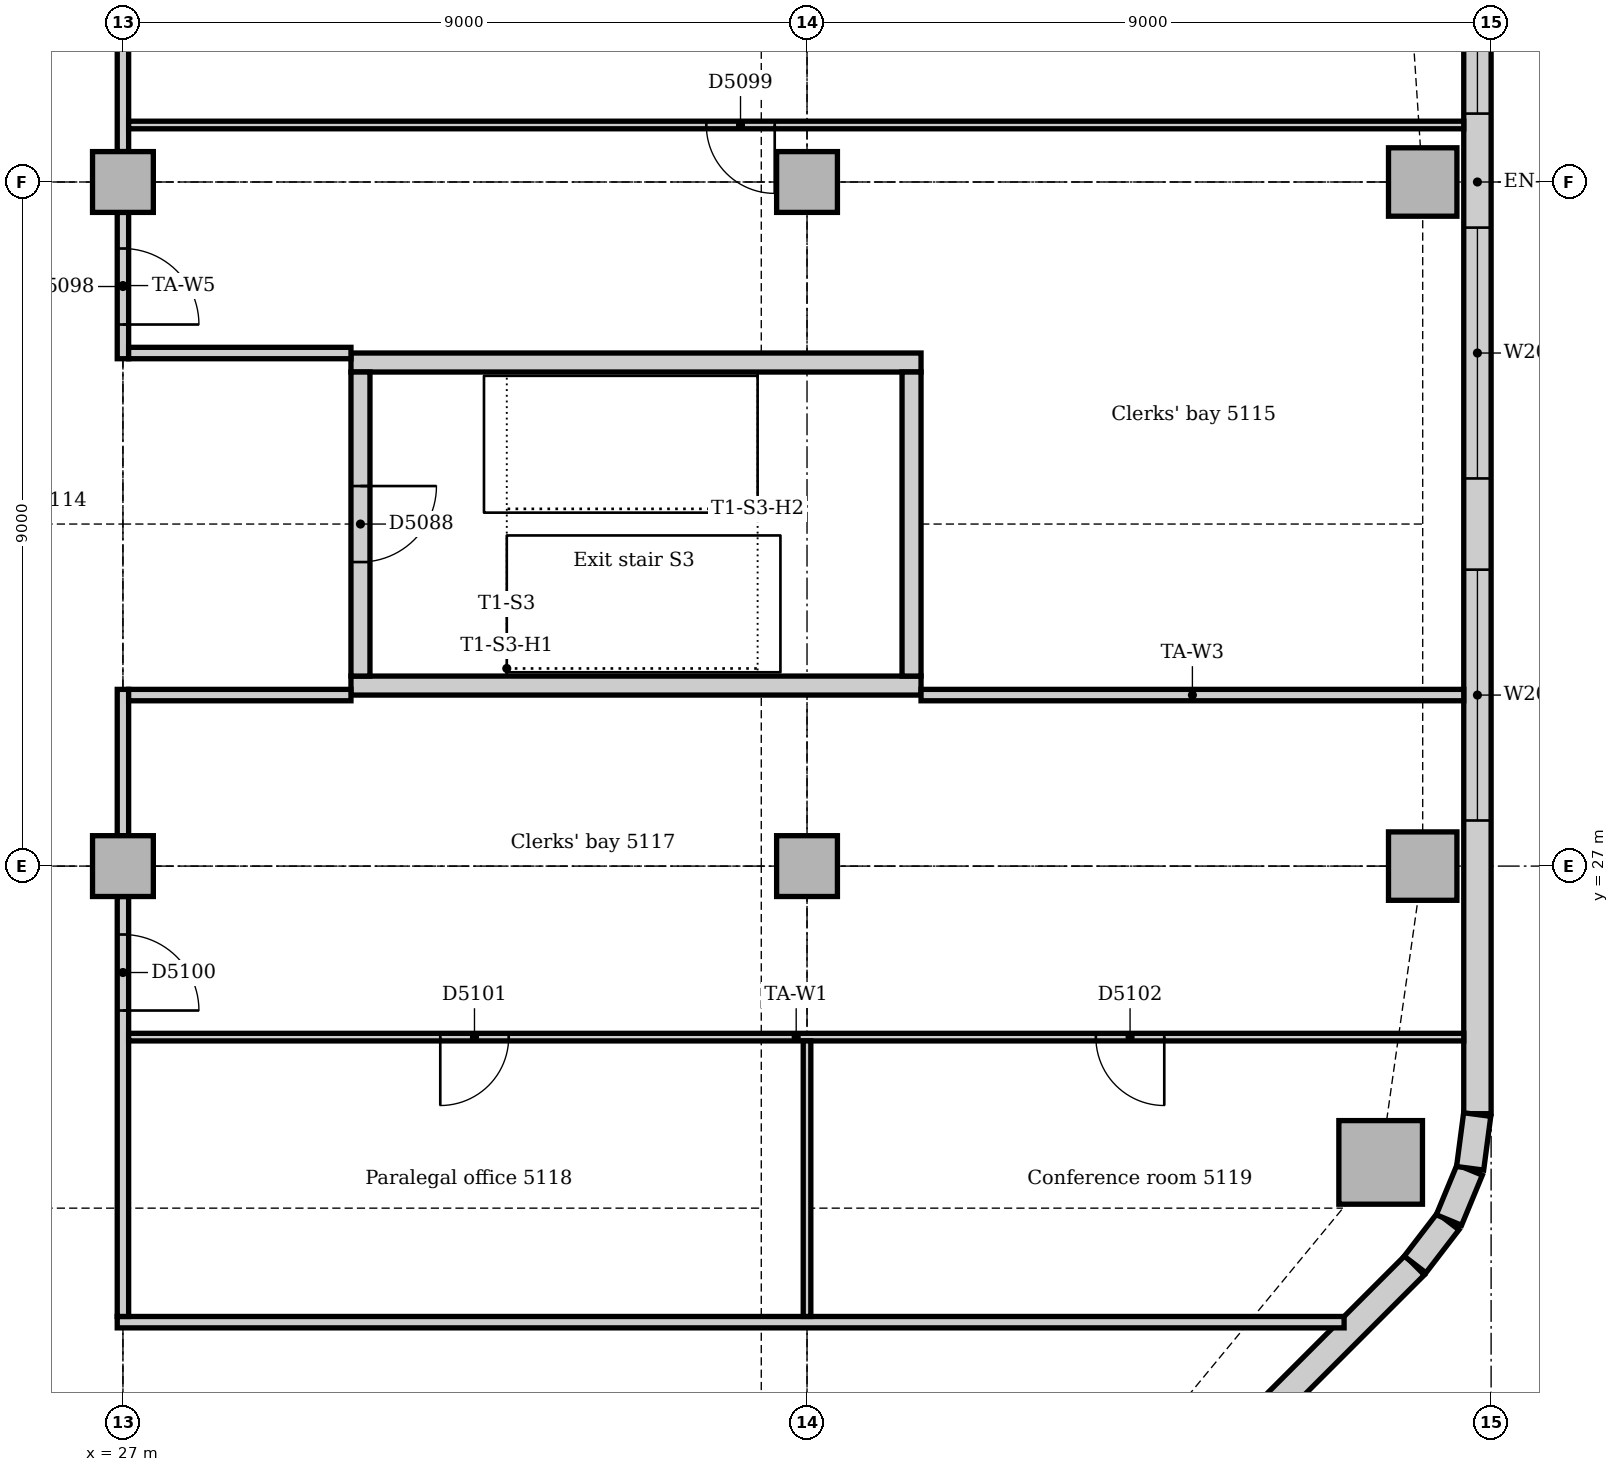
"""IFC4 building model, lengths in metres.
Left out: names, types, materials, properties, quantities, classifications, styles, units other than length and angle.
Written with IfcOpenShell. Run it as: python <this file> out.ifc"""

import sys

from ifc_helpers import new_model, si_unit, direction, frame, frame_2d, origin, origin_2d, place, context, subcontext, project, spatial, rectangle, extrude, element, fill, save


model = new_model("IFC4")
c1 = context("Model", 3, precision=1e-05, world=origin(), true_north=direction((0.0, 1.0)))
c2 = subcontext(c1, "Body", "Model", "MODEL_VIEW")
j1 = project(units=[si_unit("LENGTHUNIT", "METRE"), si_unit("PLANEANGLEUNIT", "RADIAN")], contexts=[c1])
p1 = place(None, origin())
s1 = spatial("IfcSite", under=j1, at=p1, CompositionType="ELEMENT")
p2 = place(p1, origin())
s2 = spatial("IfcBuilding", under=s1, at=p2, CompositionType="ELEMENT")
p3 = place(p2, frame((0.0, 0.0, 214.0)))
s3 = spatial("IfcBuildingStorey", under=s2, at=p3, CompositionType="ELEMENT", Elevation=214.0)
for number, where, z_axis, x_axis in (
    (1, (30.0, 29.375, 0.0), (0.0, 0.0, 1.0), (1.0, 0.0, 0.0)),
    (2, (37.5, 33.625, 0.0), (0.0, 0.0, 1.0), (-1.0, 0.0, 0.0)),
):
    element("IfcWall", number, at=place(p3, frame(where, z_axis=z_axis, x_axis=x_axis)), inside=s3, PredefinedType="SOLIDWALL", context=c2, shape_type="SweptSolid", body=[
        extrude(rectangle(XDim=7.5, YDim=0.25, at=frame_2d((3.75, 0.0))), origin(), (0.0, 0.0, 1.0), 4.0),
    ])
p4 = place(p3, frame((37.375, 29.5, 0.0), z_axis=(0.0, 0.0, 1.0), x_axis=(0.0, 1.0, 0.0)))
e3 = element("IfcWall", 3, at=p4, inside=s3, PredefinedType="SOLIDWALL", context=c2, shape_type="SweptSolid", body=[
    extrude(rectangle(XDim=4.0, YDim=0.25, at=frame_2d((2.0, 0.0))), origin(), (0.0, 0.0, 1.0), 4.0),
])
p5 = place(p3, frame((30.125, 33.5, 0.0), z_axis=(0.0, 0.0, 1.0), x_axis=(0.0, -1.0, 0.0)))
e4 = element("IfcWall", 4, at=p5, inside=s3, PredefinedType="SOLIDWALL", context=c2, shape_type="SweptSolid", body=[
    extrude(rectangle(XDim=4.0, YDim=0.25, at=frame_2d((2.0, 0.0))), origin(), (0.0, 0.0, 1.0), 4.0),
])
p6 = place(p5, frame((1.5, 0.0, 0.0)))
e5 = element("IfcOpeningElement", 5, at=p6, cuts=e4, PredefinedType="OPENING", context=c2, shape_type="SweptSolid", body=[
    extrude(rectangle(XDim=1.0, YDim=2.1, at=frame_2d((0.5, 1.05))), frame((0.0, 0.135, 0.0), z_axis=(0.0, -1.0, 0.0), x_axis=(1.0, 0.0, 0.0)), (0.0, 0.0, 1.0), 0.27),
])
p7 = place(p3, frame((43.547, 23.102, 0.0), z_axis=(0.0, 0.0, 1.0), x_axis=(1.0, 0.0, 0.0)))
e6 = element("IfcColumn", 6, at=p7, inside=s3, PredefinedType="COLUMN", context=c2, shape_type="SweptSolid", body=[
    extrude(rectangle(XDim=1.1, YDim=1.1, at=origin_2d()), origin(), (0.0, 0.0, 1.0), 3.85),
])
for number, where, z_axis, x_axis in (
    (7, (44.1, 27.0, 0.0), (0.0, 0.0, 1.0), (1.0, 0.0, 0.0)),
    (8, (44.1, 36.0, 0.0), (0.0, 0.0, 1.0), (1.0, 0.0, 0.0)),
):
    element("IfcColumn", number, at=place(p3, frame(where, z_axis=z_axis, x_axis=x_axis)), inside=s3, PredefinedType="COLUMN", context=c2, shape_type="SweptSolid", body=[
        extrude(rectangle(XDim=0.9, YDim=0.9, at=origin_2d()), origin(), (0.0, 0.0, 1.0), 3.85),
    ])
for number, where, z_axis, x_axis in (
    (9, (27.0, 27.0, 0.0), (0.0, 0.0, 1.0), (1.0, 0.0, 0.0)),
    (10, (27.0, 36.0, 0.0), (0.0, 0.0, 1.0), (1.0, 0.0, 0.0)),
    (11, (36.0, 27.0, 0.0), (0.0, 0.0, 1.0), (1.0, 0.0, 0.0)),
    (12, (36.0, 36.0, 0.0), (0.0, 0.0, 1.0), (1.0, 0.0, 0.0)),
):
    element("IfcColumn", number, at=place(p3, frame(where, z_axis=z_axis, x_axis=x_axis)), inside=s3, PredefinedType="COLUMN", context=c2, shape_type="SweptSolid", body=[
        extrude(rectangle(XDim=0.8, YDim=0.8, at=origin_2d()), origin(), (0.0, 0.0, 1.0), 3.85),
    ])
p8 = place(p3, frame((36.751, 14.506, 0.0), z_axis=(0.0, 0.0, 1.0), x_axis=(0.707106781187, 0.707106781187, 0.0)))
e13 = element("IfcWall", 13, at=p8, inside=s3, PredefinedType="STANDARD", context=c2, shape_type="SweptSolid", body=[
    extrude(rectangle(XDim=10.243, YDim=0.36, at=frame_2d((5.121, 0.0))), origin(), (0.0, 0.0, 1.0), 3.85),
])
p9 = place(p8, frame((5.021, 0.0, 0.9)))
e14 = element("IfcOpeningElement", 14, at=p9, cuts=e13, PredefinedType="OPENING", context=c2, shape_type="SweptSolid", body=[
    extrude(rectangle(XDim=1.8, YDim=1.6, at=frame_2d((0.9, 0.8))), frame((0.0, 0.19, 0.0), z_axis=(0.0, -1.0, 0.0), x_axis=(1.0, 0.0, 0.0)), (0.0, 0.0, 1.0), 0.38),
])
p10 = place(p3, frame((44.82, 23.743, 0.0), z_axis=(0.0, 0.0, 1.0), x_axis=(0.0, 1.0, 0.0)))
e15 = element("IfcWall", 15, at=p10, inside=s3, PredefinedType="STANDARD", context=c2, shape_type="SweptSolid", body=[
    extrude(rectangle(XDim=24.515, YDim=0.36, at=frame_2d((12.257, 0.0))), origin(), (0.0, 0.0, 1.0), 3.85),
])
p11 = place(p10, frame((3.857, 0.0, 0.9)))
e16 = element("IfcOpeningElement", 16, at=p11, cuts=e15, PredefinedType="OPENING", context=c2, shape_type="SweptSolid", body=[
    extrude(rectangle(XDim=3.3, YDim=1.6, at=frame_2d((1.65, 0.8))), frame((0.0, 0.19, 0.0), z_axis=(0.0, -1.0, 0.0), x_axis=(1.0, 0.0, 0.0)), (0.0, 0.0, 1.0), 0.38),
])
p12 = place(p10, frame((8.357, 0.0, 0.9)))
e17 = element("IfcOpeningElement", 17, at=p12, cuts=e15, PredefinedType="OPENING", context=c2, shape_type="SweptSolid", body=[
    extrude(rectangle(XDim=3.3, YDim=1.6, at=frame_2d((1.65, 0.8))), frame((0.0, 0.19, 0.0), z_axis=(0.0, -1.0, 0.0), x_axis=(1.0, 0.0, 0.0)), (0.0, 0.0, 1.0), 0.38),
])
p13 = place(p10, frame((13.157, 0.0, 0.9)))
e18 = element("IfcOpeningElement", 18, at=p13, cuts=e15, PredefinedType="OPENING", context=c2, shape_type="SweptSolid", body=[
    extrude(rectangle(XDim=3.3, YDim=1.6, at=frame_2d((1.65, 0.8))), frame((0.0, 0.19, 0.0), z_axis=(0.0, -1.0, 0.0), x_axis=(1.0, 0.0, 0.0)), (0.0, 0.0, 1.0), 0.38),
])
p14 = place(p10, frame((17.357, 0.0, 0.9)))
e19 = element("IfcOpeningElement", 19, at=p14, cuts=e15, PredefinedType="OPENING", context=c2, shape_type="SweptSolid", body=[
    extrude(rectangle(XDim=3.3, YDim=1.6, at=frame_2d((1.65, 0.8))), frame((0.0, 0.19, 0.0), z_axis=(0.0, -1.0, 0.0), x_axis=(1.0, 0.0, 0.0)), (0.0, 0.0, 1.0), 0.38),
])
p15 = place(p3, frame((44.0, 21.759, 0.0), z_axis=(0.0, 0.0, 1.0), x_axis=(0.608802368033, 0.793321924995, 0.0)))
e20 = element("IfcWall", 20, at=p15, inside=s3, PredefinedType="STANDARD", context=c2, shape_type="SweptSolid", body=[
    extrude(rectangle(XDim=0.713, YDim=0.36, at=frame_2d((0.357, 0.0))), origin(), (0.0, 0.0, 1.0), 3.85),
])
for number, where, z_axis, x_axis in (
    (21, (44.445, 22.344, 0.0), (0.0, 0.0, 1.0), (0.383, 0.924, 0.0)),
    (22, (44.724, 23.024, 0.0), (0.0, 0.0, 1.0), (0.131, 0.991, 0.0)),
):
    element("IfcWall", number, at=place(p3, frame(where, z_axis=z_axis, x_axis=x_axis)), inside=s3, PredefinedType="STANDARD", context=c2, shape_type="SweptSolid", body=[
        extrude(rectangle(XDim=0.713, YDim=0.36, at=frame_2d((0.356, 0.0))), origin(), (0.0, 0.0, 1.0), 3.85),
    ])
p16 = place(p3, frame((26.925, 21.0, 0.0), z_axis=(0.0, 0.0, 1.0), x_axis=(1.0, 0.0, 0.0)))
e23 = element("IfcWall", 23, at=p16, inside=s3, PredefinedType="PARTITIONING", context=c2, shape_type="SweptSolid", body=[
    extrude(rectangle(XDim=16.141, YDim=0.15, at=frame_2d((8.07, 0.0))), origin(), (0.0, 0.0, 1.0), 3.85),
])
p17 = place(p3, frame((27.0, 33.675, 0.0), z_axis=(0.0, 0.0, 1.0), x_axis=(0.0, 1.0, 0.0)))
e24 = element("IfcWall", 24, at=p17, inside=s3, PredefinedType="PARTITIONING", context=c2, shape_type="SweptSolid", body=[
    extrude(rectangle(XDim=1.925, YDim=0.15, at=frame_2d((0.963, 0.0))), origin(), (0.0, 0.0, 1.0), 3.35),
])
p18 = place(p17, frame((0.45, 0.0, 0.0)))
e25 = element("IfcOpeningElement", 25, at=p18, cuts=e24, PredefinedType="OPENING", context=c2, shape_type="SweptSolid", body=[
    extrude(rectangle(XDim=1.0, YDim=2.1, at=frame_2d((0.5, 1.05))), frame((0.0, 0.085, 0.0), z_axis=(0.0, -1.0, 0.0), x_axis=(1.0, 0.0, 0.0)), (0.0, 0.0, 1.0), 0.17),
])
p19 = place(p3, frame((27.0, 36.4, 0.0), z_axis=(0.0, 0.0, 1.0), x_axis=(0.0, 1.0, 0.0)))
e26 = element("IfcWall", 26, at=p19, inside=s3, PredefinedType="PARTITIONING", context=c2, shape_type="SweptSolid", body=[
    extrude(rectangle(XDim=7.3, YDim=0.15, at=frame_2d((3.65, 0.0))), origin(), (0.0, 0.0, 1.0), 3.35),
])
p20 = place(p3, frame((27.0, 21.075, 0.0), z_axis=(0.0, 0.0, 1.0), x_axis=(0.0, 1.0, 0.0)))
e27 = element("IfcWall", 27, at=p20, inside=s3, PredefinedType="PARTITIONING", context=c2, shape_type="SweptSolid", body=[
    extrude(rectangle(XDim=5.525, YDim=0.15, at=frame_2d((2.763, 0.0))), origin(), (0.0, 0.0, 1.0), 3.35),
])
p21 = place(p20, frame((4.025, 0.0, 0.0)))
e28 = element("IfcOpeningElement", 28, at=p21, cuts=e27, PredefinedType="OPENING", context=c2, shape_type="SweptSolid", body=[
    extrude(rectangle(XDim=1.0, YDim=2.1, at=frame_2d((0.5, 1.05))), frame((0.0, 0.085, 0.0), z_axis=(0.0, -1.0, 0.0), x_axis=(1.0, 0.0, 0.0)), (0.0, 0.0, 1.0), 0.17),
])
p22 = place(p3, frame((27.0, 27.4, 0.0), z_axis=(0.0, 0.0, 1.0), x_axis=(0.0, 1.0, 0.0)))
e29 = element("IfcWall", 29, at=p22, inside=s3, PredefinedType="PARTITIONING", context=c2, shape_type="SweptSolid", body=[
    extrude(rectangle(XDim=1.925, YDim=0.15, at=frame_2d((0.963, 0.0))), origin(), (0.0, 0.0, 1.0), 3.35),
])
for number, where, z_axis, x_axis in (
    (30, (27.075, 29.25, 0.0), (0.0, 0.0, 1.0), (1.0, 0.0, 0.0)),
    (31, (27.075, 33.75, 0.0), (0.0, 0.0, 1.0), (1.0, 0.0, 0.0)),
):
    element("IfcWall", number, at=place(p3, frame(where, z_axis=z_axis, x_axis=x_axis)), inside=s3, PredefinedType="PARTITIONING", context=c2, shape_type="SweptSolid", body=[
        extrude(rectangle(XDim=2.925, YDim=0.15, at=frame_2d((1.462, 0.0))), origin(), (0.0, 0.0, 1.0), 3.85),
    ])
p23 = place(p3, frame((37.5, 29.25, 0.0), z_axis=(0.0, 0.0, 1.0), x_axis=(1.0, 0.0, 0.0)))
e32 = element("IfcWall", 32, at=p23, inside=s3, PredefinedType="PARTITIONING", context=c2, shape_type="SweptSolid", body=[
    extrude(rectangle(XDim=7.14, YDim=0.15, at=frame_2d((3.57, 0.0))), origin(), (0.0, 0.0, 1.0), 3.85),
])
p24 = place(p3, frame((27.075, 24.75, 0.0), z_axis=(0.0, 0.0, 1.0), x_axis=(1.0, 0.0, 0.0)))
e33 = element("IfcWall", 33, at=p24, inside=s3, PredefinedType="PARTITIONING", context=c2, shape_type="SweptSolid", body=[
    extrude(rectangle(XDim=17.565, YDim=0.1, at=frame_2d((8.783, 0.0))), origin(), (0.0, 0.0, 1.0), 3.85),
])
p25 = place(p24, frame((4.1, 0.0, 0.0)))
e34 = element("IfcOpeningElement", 34, at=p25, cuts=e33, PredefinedType="OPENING", context=c2, shape_type="SweptSolid", body=[
    extrude(rectangle(XDim=0.9, YDim=2.1, at=frame_2d((0.45, 1.05))), frame((0.0, 0.06, 0.0), z_axis=(0.0, -1.0, 0.0), x_axis=(1.0, 0.0, 0.0)), (0.0, 0.0, 1.0), 0.12),
])
p26 = place(p24, frame((12.725, 0.0, 0.0)))
e35 = element("IfcOpeningElement", 35, at=p26, cuts=e33, PredefinedType="OPENING", context=c2, shape_type="SweptSolid", body=[
    extrude(rectangle(XDim=0.9, YDim=2.1, at=frame_2d((0.45, 1.05))), frame((0.0, 0.06, 0.0), z_axis=(0.0, -1.0, 0.0), x_axis=(1.0, 0.0, 0.0)), (0.0, 0.0, 1.0), 0.12),
])
p27 = place(p3, frame((27.075, 36.75, 0.0), z_axis=(0.0, 0.0, 1.0), x_axis=(1.0, 0.0, 0.0)))
e36 = element("IfcWall", 36, at=p27, inside=s3, PredefinedType="PARTITIONING", context=c2, shape_type="SweptSolid", body=[
    extrude(rectangle(XDim=17.565, YDim=0.1, at=frame_2d((8.783, 0.0))), origin(), (0.0, 0.0, 1.0), 3.85),
])
p28 = place(p27, frame((7.6, 0.0, 0.0)))
e37 = element("IfcOpeningElement", 37, at=p28, cuts=e36, PredefinedType="OPENING", context=c2, shape_type="SweptSolid", body=[
    extrude(rectangle(XDim=0.9, YDim=2.1, at=frame_2d((0.45, 1.05))), frame((0.0, 0.06, 0.0), z_axis=(0.0, -1.0, 0.0), x_axis=(1.0, 0.0, 0.0)), (0.0, 0.0, 1.0), 0.12),
])
p29 = place(p3, frame((36.0, 21.075, 0.0), z_axis=(0.0, 0.0, 1.0), x_axis=(0.0, 1.0, 0.0)))
e38 = element("IfcWall", 38, at=p29, inside=s3, PredefinedType="PARTITIONING", context=c2, shape_type="SweptSolid", body=[
    extrude(rectangle(XDim=3.625, YDim=0.1, at=frame_2d((1.812, 0.0))), origin(), (0.0, 0.0, 1.0), 3.35),
])
p30 = place(p11, origin())
e39 = element("IfcWindow", 39, at=p30, inside=s3, PartitioningType="SINGLE_PANEL", PredefinedType="WINDOW", context=c2, shape_type="SweptSolid", body=[
    extrude(rectangle(XDim=3.3, YDim=1.6, at=frame_2d((1.65, 0.8))), frame((0.0, 0.13, 0.0), z_axis=(0.0, -1.0, 0.0), x_axis=(1.0, 0.0, 0.0)), (0.0, 0.0, 1.0), 0.06),
])
fill(e16, e39)
p31 = place(p12, origin())
e40 = element("IfcWindow", 40, at=p31, inside=s3, PartitioningType="SINGLE_PANEL", PredefinedType="WINDOW", context=c2, shape_type="SweptSolid", body=[
    extrude(rectangle(XDim=3.3, YDim=1.6, at=frame_2d((1.65, 0.8))), frame((0.0, 0.13, 0.0), z_axis=(0.0, -1.0, 0.0), x_axis=(1.0, 0.0, 0.0)), (0.0, 0.0, 1.0), 0.06),
])
fill(e17, e40)
p32 = place(p13, origin())
e41 = element("IfcWindow", 41, at=p32, inside=s3, PartitioningType="SINGLE_PANEL", PredefinedType="WINDOW", context=c2, shape_type="SweptSolid", body=[
    extrude(rectangle(XDim=3.3, YDim=1.6, at=frame_2d((1.65, 0.8))), frame((0.0, 0.13, 0.0), z_axis=(0.0, -1.0, 0.0), x_axis=(1.0, 0.0, 0.0)), (0.0, 0.0, 1.0), 0.06),
])
fill(e18, e41)
p33 = place(p6, origin())
e42 = element("IfcDoor", 42, at=p33, inside=s3, OperationType="SINGLE_SWING_LEFT", PredefinedType="DOOR", context=c2, shape_type="SweptSolid", body=[
    extrude(rectangle(XDim=1.0, YDim=2.1, at=frame_2d((0.5, 1.05))), frame((0.0, 0.025, 0.0), z_axis=(0.0, -1.0, 0.0), x_axis=(1.0, 0.0, 0.0)), (0.0, 0.0, 1.0), 0.05),
])
fill(e5, e42)
p34 = place(p18, frame((1.0, 0.0, 0.0), z_axis=(0.0, 0.0, 1.0), x_axis=(-1.0, 0.0, 0.0)))
e43 = element("IfcDoor", 43, at=p34, inside=s3, OperationType="SINGLE_SWING_RIGHT", PredefinedType="DOOR", context=c2, shape_type="SweptSolid", body=[
    extrude(rectangle(XDim=1.0, YDim=2.1, at=frame_2d((0.5, 1.05))), frame((0.0, 0.025, 0.0), z_axis=(0.0, -1.0, 0.0), x_axis=(1.0, 0.0, 0.0)), (0.0, 0.0, 1.0), 0.05),
])
fill(e25, e43)
p35 = place(p28, frame((0.9, 0.0, 0.0), z_axis=(0.0, 0.0, 1.0), x_axis=(-1.0, 0.0, 0.0)))
e44 = element("IfcDoor", 44, at=p35, inside=s3, OperationType="SINGLE_SWING_LEFT", PredefinedType="DOOR", context=c2, shape_type="SweptSolid", body=[
    extrude(rectangle(XDim=0.9, YDim=2.1, at=frame_2d((0.45, 1.05))), frame((0.0, 0.025, 0.0), z_axis=(0.0, -1.0, 0.0), x_axis=(1.0, 0.0, 0.0)), (0.0, 0.0, 1.0), 0.05),
])
fill(e37, e44)
p36 = place(p21, frame((1.0, 0.0, 0.0), z_axis=(0.0, 0.0, 1.0), x_axis=(-1.0, 0.0, 0.0)))
e45 = element("IfcDoor", 45, at=p36, inside=s3, OperationType="SINGLE_SWING_RIGHT", PredefinedType="DOOR", context=c2, shape_type="SweptSolid", body=[
    extrude(rectangle(XDim=1.0, YDim=2.1, at=frame_2d((0.5, 1.05))), frame((0.0, 0.025, 0.0), z_axis=(0.0, -1.0, 0.0), x_axis=(1.0, 0.0, 0.0)), (0.0, 0.0, 1.0), 0.05),
])
fill(e28, e45)
p37 = place(p25, frame((0.9, 0.0, 0.0), z_axis=(0.0, 0.0, 1.0), x_axis=(-1.0, 0.0, 0.0)))
e46 = element("IfcDoor", 46, at=p37, inside=s3, OperationType="SINGLE_SWING_RIGHT", PredefinedType="DOOR", context=c2, shape_type="SweptSolid", body=[
    extrude(rectangle(XDim=0.9, YDim=2.1, at=frame_2d((0.45, 1.05))), frame((0.0, 0.025, 0.0), z_axis=(0.0, -1.0, 0.0), x_axis=(1.0, 0.0, 0.0)), (0.0, 0.0, 1.0), 0.05),
])
fill(e34, e46)
p38 = place(p26, frame((0.9, 0.0, 0.0), z_axis=(0.0, 0.0, 1.0), x_axis=(-1.0, 0.0, 0.0)))
e47 = element("IfcDoor", 47, at=p38, inside=s3, OperationType="SINGLE_SWING_LEFT", PredefinedType="DOOR", context=c2, shape_type="SweptSolid", body=[
    extrude(rectangle(XDim=0.9, YDim=2.1, at=frame_2d((0.45, 1.05))), frame((0.0, 0.025, 0.0), z_axis=(0.0, -1.0, 0.0), x_axis=(1.0, 0.0, 0.0)), (0.0, 0.0, 1.0), 0.05),
])
fill(e35, e47)
save(model, sys.argv[1])
